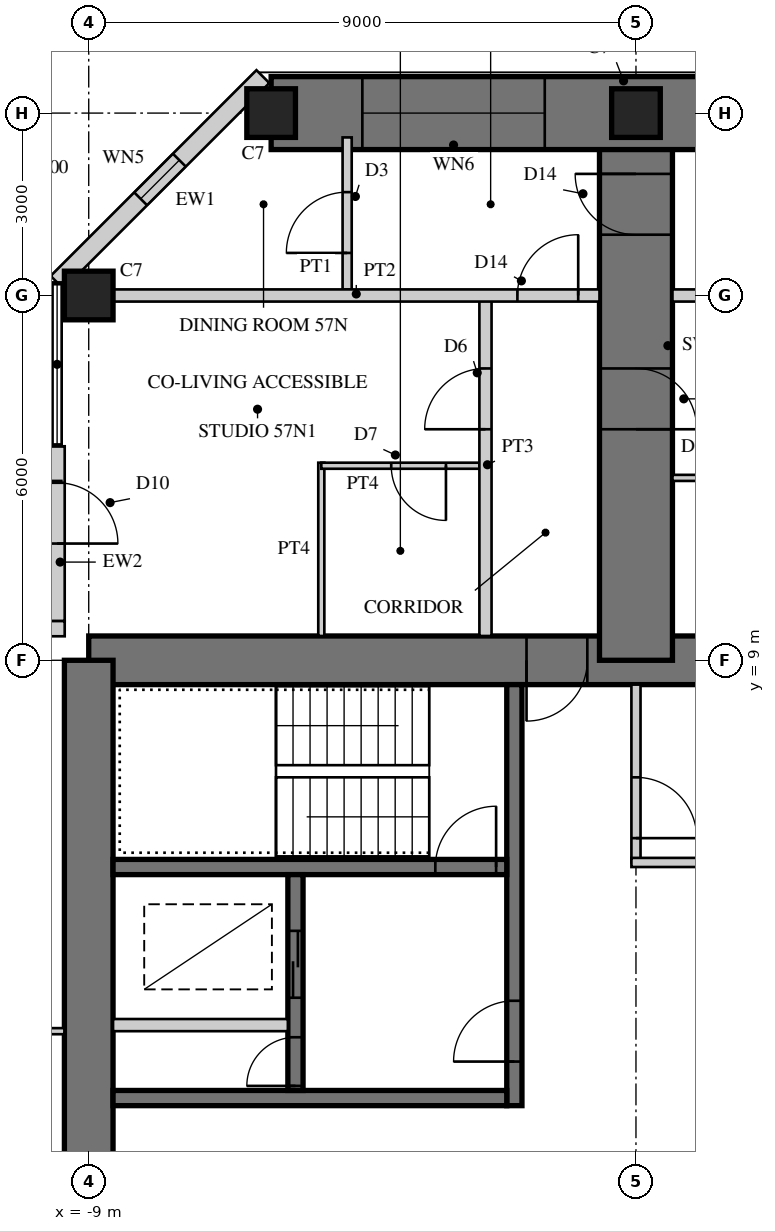
"""IFC4 building model, lengths in metres.
Left out: names, types, materials, properties, quantities, classifications, styles, units other than length and angle.
Written with IfcOpenShell. Run it as: python <this file> out.ifc"""

import sys

from ifc_helpers import new_model, si_unit, direction, frame, frame_2d, origin, origin_2d, place, context, subcontext, project, spatial, rectangle, hollow_rectangle, extrude, element, fill, save


model = new_model("IFC4")
c1 = context("Model", 3, precision=1e-05, world=origin(), true_north=direction((0.0, 1.0)))
c2 = subcontext(c1, "Body", "Model", "MODEL_VIEW")
j1 = project(units=[si_unit("LENGTHUNIT", "METRE"), si_unit("PLANEANGLEUNIT", "RADIAN")], contexts=[c1])
p1 = place(None, origin())
s1 = spatial("IfcSite", under=j1, at=p1, CompositionType="ELEMENT")
p2 = place(p1, origin())
s2 = spatial("IfcBuilding", under=s1, at=p2, CompositionType="ELEMENT")
p3 = place(p2, frame((0.0, 0.0, 225.5)))
s3 = spatial("IfcBuildingStorey", under=s2, at=p3, CompositionType="ELEMENT", Elevation=225.5)
p4 = place(p3, frame((9.0, 9.0, 0.0), z_axis=(0.0, 0.0, 1.0), x_axis=(-1.0, 0.0, 0.0)))
e1 = element("IfcWall", 1, at=p4, inside=s3, PredefinedType="SHEAR", context=c2, shape_type="SweptSolid", body=[
    extrude(rectangle(XDim=18.0, YDim=0.8, at=frame_2d((9.0, 0.0))), origin(), (0.0, 0.0, 1.0), 3.4),
])
p5 = place(p4, frame((9.8, 0.0, 0.0)))
e2 = element("IfcOpeningElement", 2, at=p5, cuts=e1, PredefinedType="OPENING", context=c2, shape_type="SweptSolid", body=[
    extrude(rectangle(XDim=1.0, YDim=2.4, at=frame_2d((0.5, 1.2))), frame((0.0, 0.41, 0.0), z_axis=(0.0, -1.0, 0.0), x_axis=(1.0, 0.0, 0.0)), (0.0, 0.0, 1.0), 0.82),
])
p6 = place(p3, frame((-9.0, 9.0, 0.0), z_axis=(0.0, 0.0, 1.0), x_axis=(0.0, -1.0, 0.0)))
e3 = element("IfcWall", 3, at=p6, inside=s3, PredefinedType="SHEAR", context=c2, shape_type="SweptSolid", body=[
    extrude(rectangle(XDim=18.0, YDim=0.8, at=frame_2d((9.0, 0.0))), origin(), (0.0, 0.0, 1.0), 3.4),
])
p7 = place(p6, frame((9.8, 0.0, 0.0)))
e4 = element("IfcOpeningElement", 4, at=p7, cuts=e3, PredefinedType="OPENING", context=c2, shape_type="SweptSolid", body=[
    extrude(rectangle(XDim=1.0, YDim=2.4, at=frame_2d((0.5, 1.2))), frame((0.0, 0.41, 0.0), z_axis=(0.0, -1.0, 0.0), x_axis=(1.0, 0.0, 0.0)), (0.0, 0.0, 1.0), 0.82),
])
p8 = place(p3, frame((-2.0, 1.675, 0.0), z_axis=(0.0, 0.0, 1.0), x_axis=(0.0, 1.0, 0.0)))
e5 = element("IfcWall", 5, at=p8, inside=s3, PredefinedType="SHEAR", context=c2, shape_type="SweptSolid", body=[
    extrude(rectangle(XDim=6.925, YDim=0.25, at=frame_2d((3.462, 0.0))), origin(), (0.0, 0.0, 1.0), 3.4),
])
p9 = place(p8, frame((0.725, 0.0, 0.0)))
e6 = element("IfcOpeningElement", 6, at=p9, cuts=e5, PredefinedType="OPENING", context=c2, shape_type="SweptSolid", body=[
    extrude(rectangle(XDim=1.0, YDim=2.1, at=frame_2d((0.5, 1.05))), frame((0.0, 0.135, 0.0), z_axis=(0.0, -1.0, 0.0), x_axis=(1.0, 0.0, 0.0)), (0.0, 0.0, 1.0), 0.27),
])
p10 = place(p3, frame((-2.125, 1.8, 0.0), z_axis=(0.0, 0.0, 1.0), x_axis=(-1.0, 0.0, 0.0)))
e7 = element("IfcWall", 7, at=p10, inside=s3, PredefinedType="SHEAR", context=c2, shape_type="SweptSolid", body=[
    extrude(rectangle(XDim=6.475, YDim=0.25, at=frame_2d((3.238, 0.0))), origin(), (0.0, 0.0, 1.0), 3.4),
])
p11 = place(p3, frame((-2.125, 5.6, 0.0), z_axis=(0.0, 0.0, 1.0), x_axis=(-1.0, 0.0, 0.0)))
e8 = element("IfcWall", 8, at=p11, inside=s3, PredefinedType="SHEAR", context=c2, shape_type="SweptSolid", body=[
    extrude(rectangle(XDim=6.475, YDim=0.25, at=frame_2d((3.238, 0.0))), origin(), (0.0, 0.0, 1.0), 3.4),
])
p12 = place(p11, frame((0.175, 0.0, 0.0)))
e9 = element("IfcOpeningElement", 9, at=p12, cuts=e8, PredefinedType="OPENING", context=c2, shape_type="SweptSolid", body=[
    extrude(rectangle(XDim=1.0, YDim=2.1, at=frame_2d((0.5, 1.05))), frame((0.0, 0.135, 0.0), z_axis=(0.0, -1.0, 0.0), x_axis=(1.0, 0.0, 0.0)), (0.0, 0.0, 1.0), 0.27),
])
p13 = place(p3, frame((-5.6, 1.925, 0.0), z_axis=(0.0, 0.0, 1.0), x_axis=(0.0, 1.0, 0.0)))
e10 = element("IfcWall", 10, at=p13, inside=s3, PredefinedType="SHEAR", context=c2, shape_type="SweptSolid", body=[
    extrude(rectangle(XDim=3.55, YDim=0.25, at=frame_2d((1.775, 0.0))), origin(), (0.0, 0.0, 1.0), 3.4),
])
p14 = place(p13, frame((1.525, 0.0, 0.0)))
e11 = element("IfcOpeningElement", 11, at=p14, cuts=e10, PredefinedType="OPENING", context=c2, shape_type="SweptSolid", body=[
    extrude(rectangle(XDim=1.1, YDim=2.2, at=frame_2d((0.55, 1.1))), frame((0.0, 0.135, 0.0), z_axis=(0.0, -1.0, 0.0), x_axis=(1.0, 0.0, 0.0)), (0.0, 0.0, 1.0), 0.27),
])
p15 = place(p13, frame((0.075, 0.0, 0.0)))
e12 = element("IfcOpeningElement", 12, at=p15, cuts=e10, PredefinedType="OPENING", context=c2, shape_type="SweptSolid", body=[
    extrude(rectangle(XDim=0.8, YDim=2.1, at=frame_2d((0.4, 1.05))), frame((0.0, 0.135, 0.0), z_axis=(0.0, -1.0, 0.0), x_axis=(1.0, 0.0, 0.0)), (0.0, 0.0, 1.0), 0.27),
])
p16 = place(p3, frame((-5.725, 3.0, 0.0), z_axis=(0.0, 0.0, 1.0), x_axis=(-1.0, 0.0, 0.0)))
e13 = element("IfcWall", 13, at=p16, inside=s3, PredefinedType="PARTITIONING", context=c2, shape_type="SweptSolid", body=[
    extrude(rectangle(XDim=2.875, YDim=0.2, at=frame_2d((1.438, 0.0))), origin(), (0.0, 0.0, 1.0), 3.4),
])
p17 = place(p3, frame((0.0, 9.0, 0.0), z_axis=(0.0, 0.0, 1.0), x_axis=(0.0, 1.0, 0.0)))
e14 = element("IfcWall", 14, at=p17, inside=s3, PredefinedType="SHEAR", context=c2, shape_type="SweptSolid", body=[
    extrude(rectangle(XDim=9.0, YDim=1.2, at=frame_2d((4.5, 0.0))), origin(), (0.0, 0.0, 1.0), 3.4),
])
p18 = place(p17, frame((3.8, 0.0, 0.0)))
e15 = element("IfcOpeningElement", 15, at=p18, cuts=e14, PredefinedType="OPENING", context=c2, shape_type="SweptSolid", body=[
    extrude(rectangle(XDim=1.0, YDim=2.15, at=frame_2d((0.5, 1.075))), frame((0.0, 0.61, 0.0), z_axis=(0.0, -1.0, 0.0), x_axis=(1.0, 0.0, 0.0)), (0.0, 0.0, 1.0), 1.22),
])
p19 = place(p17, frame((7.0, 0.0, 0.0)))
e16 = element("IfcOpeningElement", 16, at=p19, cuts=e14, PredefinedType="OPENING", context=c2, shape_type="SweptSolid", body=[
    extrude(rectangle(XDim=1.0, YDim=2.2, at=frame_2d((0.5, 1.1))), frame((0.0, 0.61, 0.0), z_axis=(0.0, -1.0, 0.0), x_axis=(1.0, 0.0, 0.0)), (0.0, 0.0, 1.0), 1.22),
])
p20 = place(p3, frame((6.0, 18.0, 0.0), z_axis=(0.0, 0.0, 1.0), x_axis=(-1.0, 0.0, 0.0)))
e17 = element("IfcWall", 17, at=p20, inside=s3, PredefinedType="SHEAR", context=c2, shape_type="SweptSolid", body=[
    extrude(rectangle(XDim=12.0, YDim=1.2, at=frame_2d((6.0, 0.0))), origin(), (0.0, 0.0, 1.0), 3.4),
])
p21 = place(p20, frame((1.5, 0.0, 0.6)))
e18 = element("IfcOpeningElement", 18, at=p21, cuts=e17, PredefinedType="OPENING", context=c2, shape_type="SweptSolid", body=[
    extrude(rectangle(XDim=3.0, YDim=2.4, at=frame_2d((1.5, 1.2))), frame((0.0, 0.61, 0.0), z_axis=(0.0, -1.0, 0.0), x_axis=(1.0, 0.0, 0.0)), (0.0, 0.0, 1.0), 1.22),
])
p22 = place(p20, frame((7.5, 0.0, 0.6)))
e19 = element("IfcOpeningElement", 19, at=p22, cuts=e17, PredefinedType="OPENING", context=c2, shape_type="SweptSolid", body=[
    extrude(rectangle(XDim=3.0, YDim=2.4, at=frame_2d((1.5, 1.2))), frame((0.0, 0.61, 0.0), z_axis=(0.0, -1.0, 0.0), x_axis=(1.0, 0.0, 0.0)), (0.0, 0.0, 1.0), 1.22),
])
for number, where, z_axis, x_axis in (
    (20, (-9.0, 15.0, 0.0), (0.0, 0.0, 1.0), (1.0, 0.0, 0.0)),
    (21, (0.0, 18.0, 0.0), (0.0, 0.0, 1.0), (1.0, 0.0, 0.0)),
    (22, (-6.0, 18.0, 0.0), (0.0, 0.0, 1.0), (1.0, 0.0, 0.0)),
):
    element("IfcColumn", number, at=place(p3, frame(where, z_axis=z_axis, x_axis=x_axis)), inside=s3, PredefinedType="COLUMN", context=c2, shape_type="SweptSolid", body=[
        extrude(rectangle(XDim=0.8, YDim=0.8, at=origin_2d()), origin(), (0.0, 0.0, 1.0), 3.4),
    ])
p23 = place(p3, frame((-6.135, 18.6, 0.0), z_axis=(0.0, 0.0, 1.0), x_axis=(-0.707081278264, -0.707132283189, 0.0)))
e23 = element("IfcWall", 23, at=p23, inside=s3, PredefinedType="SOLIDWALL", context=c2, shape_type="SweptSolid", body=[
    extrude(rectangle(XDim=4.787, YDim=0.3, at=frame_2d((2.393, 0.0))), origin(), (0.0, 0.0, 1.0), 3.22),
])
p24 = place(p23, frame((1.943, 0.0, 0.3)))
e24 = element("IfcOpeningElement", 24, at=p24, cuts=e23, PredefinedType="OPENING", context=c2, shape_type="SweptSolid", body=[
    extrude(rectangle(XDim=0.9, YDim=2.4, at=frame_2d((0.45, 1.2))), frame((0.0, 0.16, 0.0), z_axis=(0.0, -1.0, 0.0), x_axis=(1.0, 0.0, 0.0)), (0.0, 0.0, 1.0), 0.32),
])
p25 = place(p3, frame((-9.52, 12.52, 0.0), z_axis=(0.0, 0.0, 1.0), x_axis=(0.0, -1.0, 0.0)))
e25 = element("IfcWall", 25, at=p25, inside=s3, PredefinedType="SOLIDWALL", context=c2, shape_type="SweptSolid", body=[
    extrude(rectangle(XDim=2.875, YDim=0.25, at=frame_2d((1.438, 0.0))), origin(), (0.0, 0.0, 1.0), 3.22),
])
p26 = place(p25, frame((0.6, 0.0, 0.0)))
e26 = element("IfcOpeningElement", 26, at=p26, cuts=e25, PredefinedType="OPENING", context=c2, shape_type="SweptSolid", body=[
    extrude(rectangle(XDim=1.0, YDim=2.2, at=frame_2d((0.5, 1.1))), frame((0.0, 0.135, 0.0), z_axis=(0.0, -1.0, 0.0), x_axis=(1.0, 0.0, 0.0)), (0.0, 0.0, 1.0), 0.27),
])
p27 = place(p3, frame((-9.395, 9.52, 0.0), z_axis=(0.0, 0.0, 1.0), x_axis=(-1.0, 0.0, 0.0)))
e27 = element("IfcWall", 27, at=p27, inside=s3, PredefinedType="SOLIDWALL", context=c2, shape_type="SweptSolid", body=[
    extrude(rectangle(XDim=3.125, YDim=0.25, at=frame_2d((1.562, 0.0))), origin(), (0.0, 0.0, 1.0), 3.22),
])
p28 = place(p27, frame((0.6, 0.0, 0.0)))
e28 = element("IfcOpeningElement", 28, at=p28, cuts=e27, PredefinedType="OPENING", context=c2, shape_type="SweptSolid", body=[
    extrude(rectangle(XDim=1.0, YDim=2.2, at=frame_2d((0.5, 1.1))), frame((0.0, 0.135, 0.0), z_axis=(0.0, -1.0, 0.0), x_axis=(1.0, 0.0, 0.0)), (0.0, 0.0, 1.0), 0.27),
])
p29 = place(p3, frame((0.0, 5.675, 0.0), z_axis=(0.0, 0.0, 1.0), x_axis=(0.0, 1.0, 0.0)))
e29 = element("IfcWall", 29, at=p29, inside=s3, PredefinedType="PARTITIONING", context=c2, shape_type="SweptSolid", body=[
    extrude(rectangle(XDim=2.925, YDim=0.15, at=frame_2d((1.462, 0.0))), origin(), (0.0, 0.0, 1.0), 3.22),
])
p30 = place(p29, frame((0.4, 0.0, 0.0)))
e30 = element("IfcOpeningElement", 30, at=p30, cuts=e29, PredefinedType="OPENING", context=c2, shape_type="SweptSolid", body=[
    extrude(rectangle(XDim=1.0, YDim=2.1, at=frame_2d((0.5, 1.05))), frame((0.0, 0.085, 0.0), z_axis=(0.0, -1.0, 0.0), x_axis=(1.0, 0.0, 0.0)), (0.0, 0.0, 1.0), 0.17),
])
p31 = place(p3, frame((1.675, 5.675, 0.0), z_axis=(0.0, 0.0, 1.0), x_axis=(-1.0, 0.0, 0.0)))
e31 = element("IfcWall", 31, at=p31, inside=s3, PredefinedType="PARTITIONING", context=c2, shape_type="SweptSolid", body=[
    extrude(rectangle(XDim=1.75, YDim=0.15, at=frame_2d((0.875, 0.0))), origin(), (0.0, 0.0, 1.0), 3.22),
])
p32 = place(p3, frame((-5.175, 9.4, 0.0), z_axis=(0.0, 0.0, 1.0), x_axis=(0.0, 1.0, 0.0)))
e32 = element("IfcWall", 32, at=p32, inside=s3, PredefinedType="PARTITIONING", context=c2, shape_type="SweptSolid", body=[
    extrude(rectangle(XDim=2.85, YDim=0.1, at=frame_2d((1.425, 0.0))), origin(), (0.0, 0.0, 1.0), 3.22),
])
p33 = place(p3, frame((-2.575, 12.2, 0.0), z_axis=(0.0, 0.0, 1.0), x_axis=(-1.0, 0.0, 0.0)))
e33 = element("IfcWall", 33, at=p33, inside=s3, PredefinedType="PARTITIONING", context=c2, shape_type="SweptSolid", body=[
    extrude(rectangle(XDim=2.6, YDim=0.1, at=frame_2d((1.3, 0.0))), origin(), (0.0, 0.0, 1.0), 3.22),
])
p34 = place(p33, frame((0.55, 0.0, 0.0)))
e34 = element("IfcOpeningElement", 34, at=p34, cuts=e33, PredefinedType="OPENING", context=c2, shape_type="SweptSolid", body=[
    extrude(rectangle(XDim=0.9, YDim=2.1, at=frame_2d((0.45, 1.05))), frame((0.0, 0.06, 0.0), z_axis=(0.0, -1.0, 0.0), x_axis=(1.0, 0.0, 0.0)), (0.0, 0.0, 1.0), 0.12),
])
p35 = place(p3, frame((2.8, 12.0, 0.0), z_axis=(0.0, 0.0, 1.0), x_axis=(-1.0, 0.0, 0.0)))
e35 = element("IfcWall", 35, at=p35, inside=s3, PredefinedType="PARTITIONING", context=c2, shape_type="SweptSolid", body=[
    extrude(rectangle(XDim=2.2, YDim=0.1, at=frame_2d((1.1, 0.0))), origin(), (0.0, 0.0, 1.0), 3.22),
])
p36 = place(p35, frame((0.55, 0.0, 0.0)))
e36 = element("IfcOpeningElement", 36, at=p36, cuts=e35, PredefinedType="OPENING", context=c2, shape_type="SweptSolid", body=[
    extrude(rectangle(XDim=0.9, YDim=2.1, at=frame_2d((0.45, 1.05))), frame((0.0, 0.06, 0.0), z_axis=(0.0, -1.0, 0.0), x_axis=(1.0, 0.0, 0.0)), (0.0, 0.0, 1.0), 0.12),
])
p37 = place(p3, frame((-2.475, 9.4, 0.0), z_axis=(0.0, 0.0, 1.0), x_axis=(0.0, 1.0, 0.0)))
e37 = element("IfcWall", 37, at=p37, inside=s3, PredefinedType="SOLIDWALL", context=c2, shape_type="SweptSolid", body=[
    extrude(rectangle(XDim=5.6, YDim=0.2, at=frame_2d((2.8, 0.0))), origin(), (0.0, 0.0, 1.0), 3.22),
])
p38 = place(p37, frame((3.4, 0.0, 0.0)))
e38 = element("IfcOpeningElement", 38, at=p38, cuts=e37, PredefinedType="OPENING", context=c2, shape_type="SweptSolid", body=[
    extrude(rectangle(XDim=1.0, YDim=2.15, at=frame_2d((0.5, 1.075))), frame((0.0, 0.11, 0.0), z_axis=(0.0, -1.0, 0.0), x_axis=(1.0, 0.0, 0.0)), (0.0, 0.0, 1.0), 0.22),
])
p39 = place(p3, frame((-4.75, 15.1, 0.0), z_axis=(0.0, 0.0, 1.0), x_axis=(0.0, 1.0, 0.0)))
e39 = element("IfcWall", 39, at=p39, inside=s3, PredefinedType="PARTITIONING", context=c2, shape_type="SweptSolid", body=[
    extrude(rectangle(XDim=2.5, YDim=0.15, at=frame_2d((1.25, 0.0))), origin(), (0.0, 0.0, 1.0), 3.22),
])
p40 = place(p39, frame((0.6, 0.0, 0.0)))
e40 = element("IfcOpeningElement", 40, at=p40, cuts=e39, PredefinedType="OPENING", context=c2, shape_type="SweptSolid", body=[
    extrude(rectangle(XDim=1.0, YDim=2.1, at=frame_2d((0.5, 1.05))), frame((0.0, 0.085, 0.0), z_axis=(0.0, -1.0, 0.0), x_axis=(1.0, 0.0, 0.0)), (0.0, 0.0, 1.0), 0.17),
])
p41 = place(p3, frame((8.6, 15.0, 0.0), z_axis=(0.0, 0.0, 1.0), x_axis=(-1.0, 0.0, 0.0)))
e41 = element("IfcWall", 41, at=p41, inside=s3, PredefinedType="SOLIDWALL", context=c2, shape_type="SweptSolid", body=[
    extrude(rectangle(XDim=8.0, YDim=0.2, at=frame_2d((4.0, 0.0))), origin(), (0.0, 0.0, 1.0), 2.52),
])
p42 = place(p3, frame((-0.6, 15.0, 0.0), z_axis=(0.0, 0.0, 1.0), x_axis=(-1.0, 0.0, 0.0)))
e42 = element("IfcWall", 42, at=p42, inside=s3, PredefinedType="SOLIDWALL", context=c2, shape_type="SweptSolid", body=[
    extrude(rectangle(XDim=8.0, YDim=0.2, at=frame_2d((4.0, 0.0))), origin(), (0.0, 0.0, 1.0), 2.52),
])
p43 = place(p42, frame((0.35, 0.0, 0.0)))
e43 = element("IfcOpeningElement", 43, at=p43, cuts=e42, PredefinedType="OPENING", context=c2, shape_type="SweptSolid", body=[
    extrude(rectangle(XDim=1.0, YDim=2.2, at=frame_2d((0.5, 1.1))), frame((0.0, 0.11, 0.0), z_axis=(0.0, -1.0, 0.0), x_axis=(1.0, 0.0, 0.0)), (0.0, 0.0, 1.0), 0.22),
])
p44 = place(p3, frame((-9.4, 2.9, 0.0), z_axis=(0.0, 0.0, 1.0), x_axis=(-1.0, 0.0, 0.0)))
e44 = element("IfcWall", 44, at=p44, inside=s3, PredefinedType="PARTITIONING", context=c2, shape_type="SweptSolid", body=[
    extrude(rectangle(XDim=2.85, YDim=0.1, at=frame_2d((1.425, 0.0))), origin(), (0.0, 0.0, 1.0), 3.22),
])
p45 = place(p22, origin())
e45 = element("IfcWindow", 45, at=p45, inside=s3, PartitioningType="SINGLE_PANEL", PredefinedType="WINDOW", context=c2, shape_type="SweptSolid", body=[
    extrude(hollow_rectangle(XDim=3.0, YDim=2.4, WallThickness=0.06, at=frame_2d((1.5, 1.2))), frame((0.0, 0.03, 0.0), z_axis=(0.0, -1.0, 0.0), x_axis=(1.0, 0.0, 0.0)), (0.0, 0.0, 1.0), 0.06),
    extrude(rectangle(XDim=2.879, YDim=2.279, at=frame_2d((1.5, 1.2))), frame((0.0, 0.03, 0.0), z_axis=(0.0, -1.0, 0.0), x_axis=(1.0, 0.0, 0.0)), (0.0, 0.0, 1.0), 0.06),
])
fill(e19, e45)
p46 = place(p24, origin())
e46 = element("IfcWindow", 46, at=p46, inside=s3, PartitioningType="SINGLE_PANEL", PredefinedType="WINDOW", context=c2, shape_type="SweptSolid", body=[
    extrude(hollow_rectangle(XDim=0.9, YDim=2.4, WallThickness=0.06, at=frame_2d((0.45, 1.2))), frame((0.0, 0.03, 0.0), z_axis=(0.0, -1.0, 0.0), x_axis=(1.0, 0.0, 0.0)), (0.0, 0.0, 1.0), 0.06),
    extrude(rectangle(XDim=0.779, YDim=2.279, at=frame_2d((0.45, 1.2))), frame((0.0, 0.03, 0.0), z_axis=(0.0, -1.0, 0.0), x_axis=(1.0, 0.0, 0.0)), (0.0, 0.0, 1.0), 0.06),
])
fill(e24, e46)
p47 = place(p26, origin())
e47 = element("IfcDoor", 47, at=p47, inside=s3, OperationType="SINGLE_SWING_RIGHT", PredefinedType="DOOR", context=c2, shape_type="SweptSolid", body=[
    extrude(hollow_rectangle(XDim=1.0, YDim=2.2, WallThickness=0.06, at=frame_2d((0.5, 1.1))), frame((0.0, 0.025, 0.0), z_axis=(0.0, -1.0, 0.0), x_axis=(1.0, 0.0, 0.0)), (0.0, 0.0, 1.0), 0.05),
    extrude(rectangle(XDim=0.879, YDim=2.079, at=frame_2d((0.5, 1.1))), frame((0.0, 0.025, 0.0), z_axis=(0.0, -1.0, 0.0), x_axis=(1.0, 0.0, 0.0)), (0.0, 0.0, 1.0), 0.05),
])
fill(e26, e47)
p48 = place(p30, frame((1.0, 0.0, 0.0), z_axis=(0.0, 0.0, 1.0), x_axis=(-1.0, 0.0, 0.0)))
e48 = element("IfcDoor", 48, at=p48, inside=s3, OperationType="SINGLE_SWING_RIGHT", PredefinedType="DOOR", context=c2, shape_type="SweptSolid", body=[
    extrude(rectangle(XDim=1.0, YDim=2.1, at=frame_2d((0.5, 1.05))), frame((0.0, 0.025, 0.0), z_axis=(0.0, -1.0, 0.0), x_axis=(1.0, 0.0, 0.0)), (0.0, 0.0, 1.0), 0.05),
])
fill(e30, e48)
p49 = place(p34, origin())
e49 = element("IfcDoor", 49, at=p49, inside=s3, OperationType="SINGLE_SWING_LEFT", PredefinedType="DOOR", context=c2, shape_type="SweptSolid", body=[
    extrude(rectangle(XDim=0.9, YDim=2.1, at=frame_2d((0.45, 1.05))), frame((0.0, 0.025, 0.0), z_axis=(0.0, -1.0, 0.0), x_axis=(1.0, 0.0, 0.0)), (0.0, 0.0, 1.0), 0.05),
])
fill(e34, e49)
p50 = place(p38, origin())
e50 = element("IfcDoor", 50, at=p50, inside=s3, OperationType="SINGLE_SWING_LEFT", PredefinedType="DOOR", context=c2, shape_type="SweptSolid", body=[
    extrude(rectangle(XDim=1.0, YDim=2.15, at=frame_2d((0.5, 1.075))), frame((0.0, 0.025, 0.0), z_axis=(0.0, -1.0, 0.0), x_axis=(1.0, 0.0, 0.0)), (0.0, 0.0, 1.0), 0.05),
])
fill(e38, e50)
p51 = place(p40, origin())
e51 = element("IfcDoor", 51, at=p51, inside=s3, OperationType="SINGLE_SWING_LEFT", PredefinedType="DOOR", context=c2, shape_type="SweptSolid", body=[
    extrude(rectangle(XDim=1.0, YDim=2.1, at=frame_2d((0.5, 1.05))), frame((0.0, 0.025, 0.0), z_axis=(0.0, -1.0, 0.0), x_axis=(1.0, 0.0, 0.0)), (0.0, 0.0, 1.0), 0.05),
])
fill(e40, e51)
p52 = place(p43, frame((1.0, 0.0, 0.0), z_axis=(0.0, 0.0, 1.0), x_axis=(-1.0, 0.0, 0.0)))
e52 = element("IfcDoor", 52, at=p52, inside=s3, OperationType="SINGLE_SWING_RIGHT", PredefinedType="DOOR", context=c2, shape_type="SweptSolid", body=[
    extrude(rectangle(XDim=1.0, YDim=2.2, at=frame_2d((0.5, 1.1))), frame((0.0, 0.025, 0.0), z_axis=(0.0, -1.0, 0.0), x_axis=(1.0, 0.0, 0.0)), (0.0, 0.0, 1.0), 0.05),
])
fill(e43, e52)
p53 = place(p18, frame((1.0, 0.0, 0.0), z_axis=(0.0, 0.0, 1.0), x_axis=(-1.0, 0.0, 0.0)))
e53 = element("IfcDoor", 53, at=p53, inside=s3, OperationType="SINGLE_SWING_RIGHT", PredefinedType="DOOR", context=c2, shape_type="SweptSolid", body=[
    extrude(rectangle(XDim=1.0, YDim=2.15, at=frame_2d((0.5, 1.075))), frame((0.0, 0.025, 0.0), z_axis=(0.0, -1.0, 0.0), x_axis=(1.0, 0.0, 0.0)), (0.0, 0.0, 1.0), 0.05),
])
fill(e15, e53)
p54 = place(p19, origin())
e54 = element("IfcDoor", 54, at=p54, inside=s3, OperationType="SINGLE_SWING_RIGHT", PredefinedType="DOOR", context=c2, shape_type="SweptSolid", body=[
    extrude(rectangle(XDim=1.0, YDim=2.2, at=frame_2d((0.5, 1.1))), frame((0.0, 0.025, 0.0), z_axis=(0.0, -1.0, 0.0), x_axis=(1.0, 0.0, 0.0)), (0.0, 0.0, 1.0), 0.05),
])
fill(e16, e54)
p55 = place(p5, origin())
e55 = element("IfcDoor", 55, at=p55, inside=s3, OperationType="SINGLE_SWING_RIGHT", PredefinedType="DOOR", context=c2, shape_type="SweptSolid", body=[
    extrude(rectangle(XDim=1.0, YDim=2.4, at=frame_2d((0.5, 1.2))), frame((0.0, 0.055, 0.0), z_axis=(0.0, -1.0, 0.0), x_axis=(1.0, 0.0, 0.0)), (0.0, 0.0, 1.0), 0.05),
])
fill(e2, e55)
p56 = place(p9, origin())
e56 = element("IfcDoor", 56, at=p56, inside=s3, OperationType="SINGLE_SWING_LEFT", PredefinedType="DOOR", context=c2, shape_type="SweptSolid", body=[
    extrude(rectangle(XDim=1.0, YDim=2.1, at=frame_2d((0.5, 1.05))), frame((0.0, 0.025, 0.0), z_axis=(0.0, -1.0, 0.0), x_axis=(1.0, 0.0, 0.0)), (0.0, 0.0, 1.0), 0.05),
])
fill(e6, e56)
p57 = place(p12, frame((1.0, 0.0, 0.0), z_axis=(0.0, 0.0, 1.0), x_axis=(-1.0, 0.0, 0.0)))
e57 = element("IfcDoor", 57, at=p57, inside=s3, OperationType="SINGLE_SWING_RIGHT", PredefinedType="DOOR", context=c2, shape_type="SweptSolid", body=[
    extrude(rectangle(XDim=1.0, YDim=2.1, at=frame_2d((0.5, 1.05))), frame((0.0, 0.025, 0.0), z_axis=(0.0, -1.0, 0.0), x_axis=(1.0, 0.0, 0.0)), (0.0, 0.0, 1.0), 0.05),
])
fill(e9, e57)
p58 = place(p14, origin())
e58 = element("IfcDoor", 58, at=p58, inside=s3, OperationType="DOUBLE_DOOR_SLIDING", PredefinedType="DOOR", context=c2, shape_type="SweptSolid", body=[
    extrude(rectangle(XDim=1.1, YDim=2.2, at=frame_2d((0.55, 1.1))), frame((0.0, 0.025, 0.0), z_axis=(0.0, -1.0, 0.0), x_axis=(1.0, 0.0, 0.0)), (0.0, 0.0, 1.0), 0.05),
])
fill(e11, e58)
p59 = place(p15, origin())
e59 = element("IfcDoor", 59, at=p59, inside=s3, OperationType="SINGLE_SWING_LEFT", PredefinedType="DOOR", context=c2, shape_type="SweptSolid", body=[
    extrude(rectangle(XDim=0.8, YDim=2.1, at=frame_2d((0.4, 1.05))), frame((0.0, 0.025, 0.0), z_axis=(0.0, -1.0, 0.0), x_axis=(1.0, 0.0, 0.0)), (0.0, 0.0, 1.0), 0.05),
])
fill(e12, e59)
save(model, sys.argv[1])
